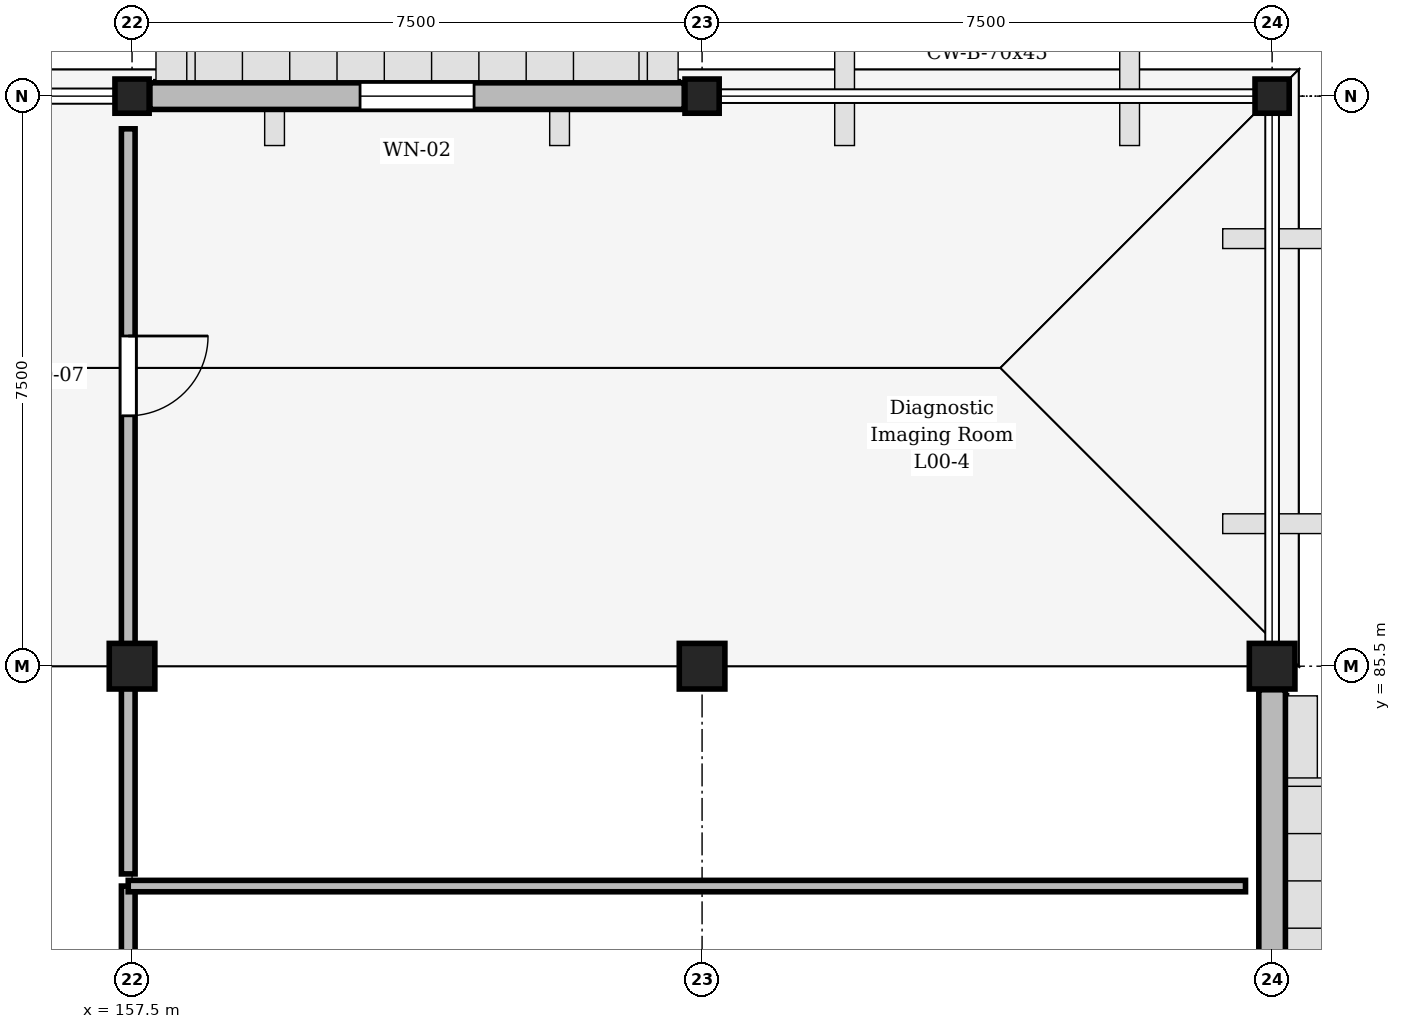
"""IFC4 building model, lengths in metres.
Left out: names, types, materials, properties, quantities, classifications, styles, units other than length and angle.
Written with IfcOpenShell. Run it as: python <this file> out.ifc"""

import sys

from ifc_helpers import new_model, si_unit, direction, frame, frame_2d, origin, origin_2d, place, context, subcontext, project, spatial, rectangle, circle, extrude, element, fill, save


model = new_model("IFC4")
c1 = context("Model", 3, precision=1e-05, world=origin(), true_north=direction((0.0, 1.0)))
c2 = subcontext(c1, "Body", "Model", "MODEL_VIEW")
j1 = project(units=[si_unit("LENGTHUNIT", "METRE"), si_unit("PLANEANGLEUNIT", "RADIAN")], contexts=[c1])
p1 = place(None, origin())
s1 = spatial("IfcSite", under=j1, at=p1, CompositionType="ELEMENT")
p2 = place(p1, origin())
s2 = spatial("IfcBuilding", under=s1, at=p2, CompositionType="ELEMENT")
p3 = place(p2, origin())
s3 = spatial("IfcBuildingStorey", under=s2, at=p3, CompositionType="ELEMENT", Elevation=0.0)
p4 = place(p3, frame((157.5, 85.5, 0.0), z_axis=(0.0, 0.0, 1.0), x_axis=(1.0, 0.0, 0.0)))
e1 = element("IfcColumn", 1, at=p4, inside=s3, PredefinedType="COLUMN", context=c2, shape_type="SweptSolid", body=[
    extrude(rectangle(XDim=0.6, YDim=0.6, at=origin_2d()), origin(), (0.0, 0.0, 1.0), 4.8),
])
p5 = place(p3, frame((157.5, 93.0, 0.0), z_axis=(0.0, 0.0, 1.0), x_axis=(1.0, 0.0, 0.0)))
e2 = element("IfcColumn", 2, at=p5, inside=s3, PredefinedType="COLUMN", context=c2, shape_type="SweptSolid", body=[
    extrude(rectangle(XDim=0.45, YDim=0.45, at=origin_2d()), origin(), (0.0, 0.0, 1.0), 4.8),
])
p6 = place(p3, frame((165.0, 85.5, 0.0), z_axis=(0.0, 0.0, 1.0), x_axis=(1.0, 0.0, 0.0)))
e3 = element("IfcColumn", 3, at=p6, inside=s3, PredefinedType="COLUMN", context=c2, shape_type="SweptSolid", body=[
    extrude(circle(Radius=0.3, at=origin_2d()), origin(), (0.0, 0.0, 1.0), 4.8),
])
p7 = place(p3, frame((165.0, 93.0, 0.0), z_axis=(0.0, 0.0, 1.0), x_axis=(1.0, 0.0, 0.0)))
e4 = element("IfcColumn", 4, at=p7, inside=s3, PredefinedType="COLUMN", context=c2, shape_type="SweptSolid", body=[
    extrude(rectangle(XDim=0.45, YDim=0.45, at=origin_2d()), origin(), (0.0, 0.0, 1.0), 4.8),
])
p8 = place(p3, frame((172.5, 85.5, 0.0), z_axis=(0.0, 0.0, 1.0), x_axis=(1.0, 0.0, 0.0)))
e5 = element("IfcColumn", 5, at=p8, inside=s3, PredefinedType="COLUMN", context=c2, shape_type="SweptSolid", body=[
    extrude(rectangle(XDim=0.6, YDim=0.6, at=origin_2d()), origin(), (0.0, 0.0, 1.0), 4.8),
])
p9 = place(p3, frame((172.5, 93.0, 0.0), z_axis=(0.0, 0.0, 1.0), x_axis=(1.0, 0.0, 0.0)))
e6 = element("IfcColumn", 6, at=p9, inside=s3, PredefinedType="COLUMN", context=c2, shape_type="SweptSolid", body=[
    extrude(rectangle(XDim=0.45, YDim=0.45, at=origin_2d()), origin(), (0.0, 0.0, 1.0), 4.8),
])
p10 = place(p3, frame((157.735, 93.0, 0.0), z_axis=(0.0, 0.0, 1.0), x_axis=(1.0, 0.0, 0.0)))
e7 = element("IfcWall", 7, at=p10, inside=s3, PredefinedType="STANDARD", context=c2, shape_type="SweptSolid", body=[
    extrude(rectangle(XDim=7.03, YDim=0.35, at=frame_2d((3.515, 0.0))), origin(), (0.0, 0.0, 1.0), 4.5),
])
p11 = place(p10, frame((2.765, 0.0, 0.9)))
e8 = element("IfcOpeningElement", 8, at=p11, cuts=e7, PredefinedType="OPENING", context=c2, shape_type="SweptSolid", body=[
    extrude(rectangle(XDim=1.5, YDim=2.4, at=frame_2d((0.75, 1.2))), frame((0.0, 0.185, 0.0), z_axis=(0.0, -1.0, 0.0), x_axis=(1.0, 0.0, 0.0)), (0.0, 0.0, 1.0), 0.37),
])
p12 = place(p3, frame((172.5, 85.19, 0.0), z_axis=(0.0, 0.0, 1.0), x_axis=(0.0, -1.0, 0.0)))
e9 = element("IfcWall", 9, at=p12, inside=s3, PredefinedType="STANDARD", context=c2, shape_type="SweptSolid", body=[
    extrude(rectangle(XDim=8.38, YDim=0.35, at=frame_2d((4.19, 0.0))), origin(), (0.0, 0.0, 1.0), 3.95),
])
p13 = place(p12, frame((3.44, 0.0, 0.9)))
e10 = element("IfcOpeningElement", 10, at=p13, cuts=e9, PredefinedType="OPENING", context=c2, shape_type="SweptSolid", body=[
    extrude(rectangle(XDim=1.5, YDim=2.4, at=frame_2d((0.75, 1.2))), frame((0.0, 0.185, 0.0), z_axis=(0.0, -1.0, 0.0), x_axis=(1.0, 0.0, 0.0)), (0.0, 0.0, 1.0), 0.37),
])
p14 = place(p3, frame((157.45, 82.607, 0.0), z_axis=(0.0, 0.0, 1.0), x_axis=(0.0, -1.0, 0.0)))
e11 = element("IfcWall", 11, at=p14, inside=s3, PredefinedType="PARTITIONING", context=c2, shape_type="SweptSolid", body=[
    extrude(rectangle(XDim=9.802, YDim=0.18, at=frame_2d((4.901, 0.0))), origin(), (0.0, 0.0, 1.0), 3.785),
])
p15 = place(p14, frame((1.075, 0.0, 0.0)))
e12 = element("IfcOpeningElement", 12, at=p15, cuts=e11, PredefinedType="OPENING", context=c2, shape_type="SweptSolid", body=[
    extrude(rectangle(XDim=1.05, YDim=2.2, at=frame_2d((0.525, 1.1))), frame((0.0, 0.1, 0.0), z_axis=(0.0, -1.0, 0.0), x_axis=(1.0, 0.0, 0.0)), (0.0, 0.0, 1.0), 0.2),
])
p16 = place(p3, frame((157.45, 92.57, 0.0), z_axis=(0.0, 0.0, 1.0), x_axis=(0.0, -1.0, 0.0)))
e13 = element("IfcWall", 13, at=p16, inside=s3, PredefinedType="PARTITIONING", context=c2, shape_type="SweptSolid", body=[
    extrude(rectangle(XDim=9.802, YDim=0.18, at=frame_2d((4.901, 0.0))), origin(), (0.0, 0.0, 1.0), 3.785),
])
p17 = place(p16, frame((2.726, 0.0, 0.0)))
e14 = element("IfcOpeningElement", 14, at=p17, cuts=e13, PredefinedType="OPENING", context=c2, shape_type="SweptSolid", body=[
    extrude(rectangle(XDim=1.05, YDim=2.2, at=frame_2d((0.525, 1.1))), frame((0.0, 0.1, 0.0), z_axis=(0.0, -1.0, 0.0), x_axis=(1.0, 0.0, 0.0)), (0.0, 0.0, 1.0), 0.2),
])
p18 = place(p3, frame((157.45, 82.607, 0.0), z_axis=(0.0, 0.0, 1.0), x_axis=(1.0, 0.0, 0.0)))
e15 = element("IfcWall", 15, at=p18, inside=s3, PredefinedType="PARTITIONING", context=c2, shape_type="SweptSolid", body=[
    extrude(rectangle(XDim=14.7, YDim=0.15, at=frame_2d((7.35, 0.0))), origin(), (0.0, 0.0, 1.0), 4.485),
])
p19 = place(p11, origin())
e16 = element("IfcWindow", 16, at=p19, inside=s3, PartitioningType="SINGLE_PANEL", PredefinedType="WINDOW", context=c2, shape_type="SweptSolid", body=[
    extrude(rectangle(XDim=1.5, YDim=2.4, at=frame_2d((0.75, 1.2))), frame((0.0, 0.03, 0.0), z_axis=(0.0, -1.0, 0.0), x_axis=(1.0, 0.0, 0.0)), (0.0, 0.0, 1.0), 0.06),
])
fill(e8, e16)
p20 = place(p17, origin())
e17 = element("IfcDoor", 17, at=p20, inside=s3, OperationType="SINGLE_SWING_LEFT", PredefinedType="DOOR", context=c2, shape_type="SweptSolid", body=[
    extrude(rectangle(XDim=1.05, YDim=2.2, at=frame_2d((0.525, 1.1))), frame((0.0, 0.025, 0.0), z_axis=(0.0, -1.0, 0.0), x_axis=(1.0, 0.0, 0.0)), (0.0, 0.0, 1.0), 0.05),
])
fill(e14, e17)
save(model, sys.argv[1])
